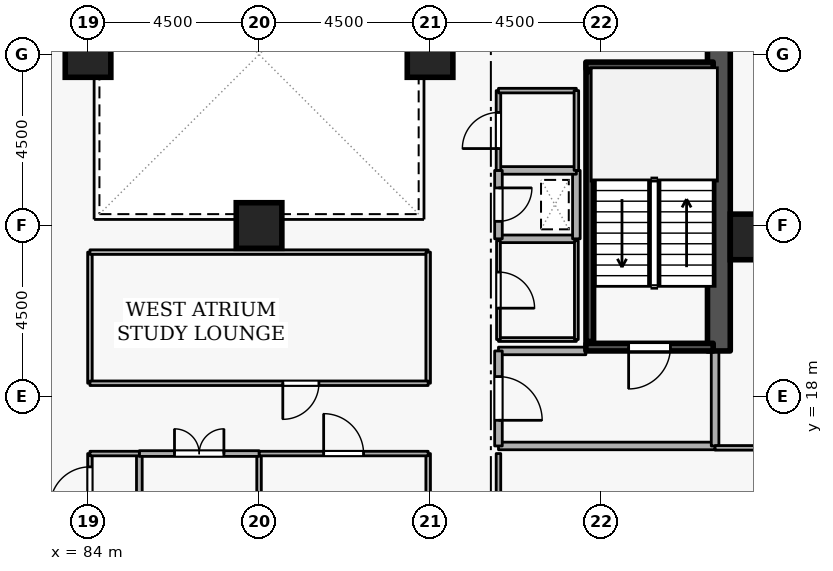
"""IFC4 building model, lengths in metres.
Left out: names, types, materials, properties, quantities, classifications, styles, units other than length and angle.
Written with IfcOpenShell. Run it as: python <this file> out.ifc"""

import sys

from ifc_helpers import new_model, si_unit, direction, frame, frame_2d, origin, origin_2d, place, context, subcontext, project, spatial, rectangle, extrude, element, fill, save


model = new_model("IFC4")
c1 = context("Model", 3, precision=1e-05, world=origin(), true_north=direction((0.0, 1.0)))
c2 = subcontext(c1, "Body", "Model", "MODEL_VIEW")
j1 = project(units=[si_unit("LENGTHUNIT", "METRE"), si_unit("PLANEANGLEUNIT", "RADIAN")], contexts=[c1])
p1 = place(None, origin())
s1 = spatial("IfcSite", under=j1, at=p1, CompositionType="ELEMENT")
p2 = place(p1, origin())
s2 = spatial("IfcBuilding", under=s1, at=p2, CompositionType="ELEMENT")
p3 = place(p2, frame((0.0, 0.0, 116.1)))
s3 = spatial("IfcBuildingStorey", under=s2, at=p3, CompositionType="ELEMENT", Elevation=116.1)
p4 = place(p3, frame((100.6, 19.2, 0.0), z_axis=(0.0, 0.0, 1.0), x_axis=(0.0, 1.0, 0.0)))
e1 = element("IfcWall", 1, at=p4, inside=s3, PredefinedType="SHEAR", context=c2, shape_type="SweptSolid", body=[
    extrude(rectangle(XDim=15.6, YDim=0.6, at=frame_2d((7.8, 0.0))), origin(), (0.0, 0.0, 1.0), 3.6),
])
for number, where, z_axis, x_axis in (
    (2, (101.5, 22.2, 0.0), (0.0, 0.0, 1.0), (1.0, 0.0, 0.0)),
    (3, (93.0, 27.0, 0.0), (0.0, 0.0, 1.0), (1.0, 0.0, 0.0)),
    (4, (84.0, 27.0, 0.0), (0.0, 0.0, 1.0), (1.0, 0.0, 0.0)),
    (5, (88.5, 22.5, 0.0), (0.0, 0.0, 1.0), (1.0, 0.0, 0.0)),
):
    element("IfcColumn", number, at=place(p3, frame(where, z_axis=z_axis, x_axis=x_axis)), inside=s3, PredefinedType="COLUMN", context=c2, shape_type="SweptSolid", body=[
        extrude(rectangle(XDim=1.2, YDim=1.2, at=origin_2d()), origin(), (0.0, 0.0, 1.0), 3.6),
    ])
p5 = place(p3, frame((100.45, 19.3, 0.0), z_axis=(0.0, 0.0, 1.0), x_axis=(-1.0, 0.0, 0.0)))
e6 = element("IfcWall", 6, at=p5, inside=s3, PredefinedType="SHEAR", context=c2, shape_type="SweptSolid", body=[
    extrude(rectangle(XDim=3.35, YDim=0.2, at=frame_2d((1.675, 0.0))), origin(), (0.0, 0.0, 1.0), 3.6),
])
p6 = place(p5, frame((1.125, 0.0, 0.0)))
e7 = element("IfcOpeningElement", 7, at=p6, cuts=e6, PredefinedType="OPENING", context=c2, shape_type="SweptSolid", body=[
    extrude(rectangle(XDim=1.1, YDim=2.1, at=frame_2d((0.55, 1.05))), frame((0.0, 0.11, 0.0), z_axis=(0.0, -1.0, 0.0), x_axis=(1.0, 0.0, 0.0)), (0.0, 0.0, 1.0), 0.22),
])
p7 = place(p3, frame((97.1, 26.7, 0.0), z_axis=(0.0, 0.0, 1.0), x_axis=(1.0, 0.0, 0.0)))
e8 = element("IfcWall", 8, at=p7, inside=s3, PredefinedType="SHEAR", context=c2, shape_type="SweptSolid", body=[
    extrude(rectangle(XDim=3.35, YDim=0.2, at=frame_2d((1.675, 0.0))), origin(), (0.0, 0.0, 1.0), 3.6),
])
p8 = place(p3, frame((97.203, 26.55, 0.0), z_axis=(0.0, 0.0, 1.0), x_axis=(0.0, -1.0, 0.0)))
e9 = element("IfcWall", 9, at=p8, inside=s3, PredefinedType="SHEAR", context=c2, shape_type="SweptSolid", body=[
    extrude(rectangle(XDim=7.1, YDim=0.2, at=frame_2d((3.55, 0.0))), origin(), (0.0, 0.0, 1.0), 3.6),
])
p9 = place(p3, frame((94.8, 16.7, 0.0), z_axis=(0.0, 0.0, 1.0), x_axis=(1.0, 0.0, 0.0)))
e10 = element("IfcWall", 10, at=p9, inside=s3, PredefinedType="STANDARD", context=c2, shape_type="SweptSolid", body=[
    extrude(rectangle(XDim=5.7, YDim=0.2, at=frame_2d((2.85, 0.0))), origin(), (0.0, 0.0, 1.0), 3.32),
])
p10 = place(p3, frame((100.5, 16.7, 0.0), z_axis=(0.0, 0.0, 1.0), x_axis=(0.0, 1.0, 0.0)))
e11 = element("IfcWall", 11, at=p10, inside=s3, PredefinedType="STANDARD", context=c2, shape_type="SweptSolid", body=[
    extrude(rectangle(XDim=2.5, YDim=0.2, at=frame_2d((1.25, 0.0))), origin(), (0.0, 0.0, 1.0), 3.32),
])
p11 = place(p3, frame((97.1, 19.2, 0.0), z_axis=(0.0, 0.0, 1.0), x_axis=(-1.0, 0.0, 0.0)))
e12 = element("IfcWall", 12, at=p11, inside=s3, PredefinedType="STANDARD", context=c2, shape_type="SweptSolid", body=[
    extrude(rectangle(XDim=2.3, YDim=0.2, at=frame_2d((1.15, 0.0))), origin(), (0.0, 0.0, 1.0), 2.525),
])
p12 = place(p3, frame((94.8, 19.2, 0.0), z_axis=(0.0, 0.0, 1.0), x_axis=(0.0, -1.0, 0.0)))
e13 = element("IfcWall", 13, at=p12, inside=s3, PredefinedType="STANDARD", context=c2, shape_type="SweptSolid", body=[
    extrude(rectangle(XDim=2.5, YDim=0.2, at=frame_2d((1.25, 0.0))), origin(), (0.0, 0.0, 1.0), 3.32),
])
p13 = place(p12, frame((0.675, 0.0, 0.0)))
e14 = element("IfcOpeningElement", 14, at=p13, cuts=e13, PredefinedType="OPENING", context=c2, shape_type="SweptSolid", body=[
    extrude(rectangle(XDim=1.15, YDim=2.1, at=frame_2d((0.575, 1.05))), frame((0.0, 0.11, 0.0), z_axis=(0.0, -1.0, 0.0), x_axis=(1.0, 0.0, 0.0)), (0.0, 0.0, 1.0), 0.22),
])
p14 = place(p3, frame((94.8, 22.15, 0.0), z_axis=(0.0, 0.0, 1.0), x_axis=(1.0, 0.0, 0.0)))
e15 = element("IfcWall", 15, at=p14, inside=s3, PredefinedType="STANDARD", context=c2, shape_type="SweptSolid", body=[
    extrude(rectangle(XDim=2.05, YDim=0.2, at=frame_2d((1.025, 0.0))), origin(), (0.0, 0.0, 1.0), 3.32),
])
p15 = place(p3, frame((96.85, 22.15, 0.0), z_axis=(0.0, 0.0, 1.0), x_axis=(0.0, 1.0, 0.0)))
e16 = element("IfcWall", 16, at=p15, inside=s3, PredefinedType="STANDARD", context=c2, shape_type="SweptSolid", body=[
    extrude(rectangle(XDim=1.8, YDim=0.2, at=frame_2d((0.9, 0.0))), origin(), (0.0, 0.0, 1.0), 3.32),
])
p16 = place(p3, frame((96.85, 23.95, 0.0), z_axis=(0.0, 0.0, 1.0), x_axis=(-1.0, 0.0, 0.0)))
e17 = element("IfcWall", 17, at=p16, inside=s3, PredefinedType="STANDARD", context=c2, shape_type="SweptSolid", body=[
    extrude(rectangle(XDim=2.05, YDim=0.2, at=frame_2d((1.025, 0.0))), origin(), (0.0, 0.0, 1.0), 3.32),
])
p17 = place(p3, frame((94.8, 23.95, 0.0), z_axis=(0.0, 0.0, 1.0), x_axis=(0.0, -1.0, 0.0)))
e18 = element("IfcWall", 18, at=p17, inside=s3, PredefinedType="STANDARD", context=c2, shape_type="SweptSolid", body=[
    extrude(rectangle(XDim=1.8, YDim=0.2, at=frame_2d((0.9, 0.0))), origin(), (0.0, 0.0, 1.0), 3.32),
])
p18 = place(p17, frame((0.46, 0.0, 0.0)))
e19 = element("IfcOpeningElement", 19, at=p18, cuts=e18, PredefinedType="OPENING", context=c2, shape_type="SweptSolid", body=[
    extrude(rectangle(XDim=0.88, YDim=2.04, at=frame_2d((0.44, 1.02))), frame((0.0, 0.11, 0.0), z_axis=(0.0, -1.0, 0.0), x_axis=(1.0, 0.0, 0.0)), (0.0, 0.0, 1.0), 0.22),
])
p19 = place(p3, frame((94.8, 19.5, 0.0), z_axis=(0.0, 0.0, 1.0), x_axis=(1.0, 0.0, 0.0)))
e20 = element("IfcWall", 20, at=p19, inside=s3, PredefinedType="PARTITIONING", context=c2, shape_type="SweptSolid", body=[
    extrude(rectangle(XDim=2.05, YDim=0.1, at=frame_2d((1.025, 0.0))), origin(), (0.0, 0.0, 1.0), 2.525),
])
p20 = place(p3, frame((96.85, 19.5, 0.0), z_axis=(0.0, 0.0, 1.0), x_axis=(0.0, 1.0, 0.0)))
e21 = element("IfcWall", 21, at=p20, inside=s3, PredefinedType="PARTITIONING", context=c2, shape_type="SweptSolid", body=[
    extrude(rectangle(XDim=2.6, YDim=0.1, at=frame_2d((1.3, 0.0))), origin(), (0.0, 0.0, 1.0), 3.32),
])
p21 = place(p3, frame((94.8, 22.1, 0.0), z_axis=(0.0, 0.0, 1.0), x_axis=(0.0, -1.0, 0.0)))
e22 = element("IfcWall", 22, at=p21, inside=s3, PredefinedType="PARTITIONING", context=c2, shape_type="SweptSolid", body=[
    extrude(rectangle(XDim=2.6, YDim=0.1, at=frame_2d((1.3, 0.0))), origin(), (0.0, 0.0, 1.0), 3.32),
])
p22 = place(p21, frame((0.825, 0.0, 0.0)))
e23 = element("IfcOpeningElement", 23, at=p22, cuts=e22, PredefinedType="OPENING", context=c2, shape_type="SweptSolid", body=[
    extrude(rectangle(XDim=0.95, YDim=2.1, at=frame_2d((0.475, 1.05))), frame((0.0, 0.06, 0.0), z_axis=(0.0, -1.0, 0.0), x_axis=(1.0, 0.0, 0.0)), (0.0, 0.0, 1.0), 0.12),
])
p23 = place(p3, frame((94.8, 23.95, 0.0), z_axis=(0.0, 0.0, 1.0), x_axis=(0.0, 1.0, 0.0)))
e24 = element("IfcWall", 24, at=p23, inside=s3, PredefinedType="PARTITIONING", context=c2, shape_type="SweptSolid", body=[
    extrude(rectangle(XDim=2.1, YDim=0.12, at=frame_2d((1.05, 0.0))), origin(), (0.0, 0.0, 1.0), 3.32),
])
p24 = place(p23, frame((0.575, 0.0, 0.0)))
e25 = element("IfcOpeningElement", 25, at=p24, cuts=e24, PredefinedType="OPENING", context=c2, shape_type="SweptSolid", body=[
    extrude(rectangle(XDim=0.95, YDim=2.1, at=frame_2d((0.475, 1.05))), frame((0.0, 0.07, 0.0), z_axis=(0.0, -1.0, 0.0), x_axis=(1.0, 0.0, 0.0)), (0.0, 0.0, 1.0), 0.14),
])
p25 = place(p3, frame((94.8, 26.05, 0.0), z_axis=(0.0, 0.0, 1.0), x_axis=(1.0, 0.0, 0.0)))
e26 = element("IfcWall", 26, at=p25, inside=s3, PredefinedType="PARTITIONING", context=c2, shape_type="SweptSolid", body=[
    extrude(rectangle(XDim=2.05, YDim=0.12, at=frame_2d((1.025, 0.0))), origin(), (0.0, 0.0, 1.0), 3.32),
])
p26 = place(p3, frame((96.85, 26.05, 0.0), z_axis=(0.0, 0.0, 1.0), x_axis=(0.0, -1.0, 0.0)))
e27 = element("IfcWall", 27, at=p26, inside=s3, PredefinedType="PARTITIONING", context=c2, shape_type="SweptSolid", body=[
    extrude(rectangle(XDim=2.1, YDim=0.12, at=frame_2d((1.05, 0.0))), origin(), (0.0, 0.0, 1.0), 3.32),
])
for number, where, z_axis, x_axis in (
    (28, (92.95, 16.5, 0.0), (0.0, 0.0, 1.0), (0.0, -1.0, 0.0)),
    (29, (94.8, 14.75, 0.0), (0.0, 0.0, 1.0), (0.0, 1.0, 0.0)),
):
    element("IfcWall", number, at=place(p3, frame(where, z_axis=z_axis, x_axis=x_axis)), inside=s3, PredefinedType="PARTITIONING", context=c2, shape_type="SweptSolid", body=[
        extrude(rectangle(XDim=1.75, YDim=0.12, at=frame_2d((0.875, 0.0))), origin(), (0.0, 0.0, 1.0), 3.32),
    ])
p27 = place(p3, frame((100.5, 16.65, 0.0), z_axis=(0.0, 0.0, 1.0), x_axis=(1.0, 0.0, 0.0)))
e30 = element("IfcWall", 30, at=p27, inside=s3, PredefinedType="PARTITIONING", context=c2, shape_type="SweptSolid", body=[
    extrude(rectangle(XDim=5.92, YDim=0.12, at=frame_2d((2.96, 0.0))), origin(), (0.0, 0.0, 1.0), 3.32),
])
p28 = place(p3, frame((88.5, 7.414, 0.0), z_axis=(0.0, 0.0, 1.0), x_axis=(0.0, 1.0, 0.0)))
e31 = element("IfcWall", 31, at=p28, inside=s3, PredefinedType="PARTITIONING", context=c2, shape_type="SweptSolid", body=[
    extrude(rectangle(XDim=9.086, YDim=0.12, at=frame_2d((4.543, 0.0))), origin(), (0.0, 0.0, 1.0), 1.685),
])
p29 = place(p3, frame((88.5, 16.5, 0.0), z_axis=(0.0, 0.0, 1.0), x_axis=(1.0, 0.0, 0.0)))
e32 = element("IfcWall", 32, at=p29, inside=s3, PredefinedType="PARTITIONING", context=c2, shape_type="SweptSolid", body=[
    extrude(rectangle(XDim=4.45, YDim=0.12, at=frame_2d((2.225, 0.0))), origin(), (0.0, 0.0, 1.0), 3.32),
])
p30 = place(p29, frame((1.7, 0.0, 0.0)))
e33 = element("IfcOpeningElement", 33, at=p30, cuts=e32, PredefinedType="OPENING", context=c2, shape_type="SweptSolid", body=[
    extrude(rectangle(XDim=1.05, YDim=2.1, at=frame_2d((0.525, 1.05))), frame((0.0, 0.07, 0.0), z_axis=(0.0, -1.0, 0.0), x_axis=(1.0, 0.0, 0.0)), (0.0, 0.0, 1.0), 0.14),
])
p31 = place(p3, frame((85.35, 3.08, 0.0), z_axis=(0.0, 0.0, 1.0), x_axis=(0.0, 1.0, 0.0)))
e34 = element("IfcWall", 34, at=p31, inside=s3, PredefinedType="PARTITIONING", context=c2, shape_type="SweptSolid", body=[
    extrude(rectangle(XDim=13.42, YDim=0.15, at=frame_2d((6.71, 0.0))), origin(), (0.0, 0.0, 1.0), 3.32),
])
p32 = place(p3, frame((85.35, 16.5, 0.0), z_axis=(0.0, 0.0, 1.0), x_axis=(1.0, 0.0, 0.0)))
e35 = element("IfcWall", 35, at=p32, inside=s3, PredefinedType="PARTITIONING", context=c2, shape_type="SweptSolid", body=[
    extrude(rectangle(XDim=3.15, YDim=0.15, at=frame_2d((1.575, 0.0))), origin(), (0.0, 0.0, 1.0), 3.32),
])
p33 = place(p32, frame((0.925, 0.0, 0.0)))
e36 = element("IfcOpeningElement", 36, at=p33, cuts=e35, PredefinedType="OPENING", context=c2, shape_type="SweptSolid", body=[
    extrude(rectangle(XDim=1.3, YDim=2.12, at=frame_2d((0.65, 1.06))), frame((0.0, 0.085, 0.0), z_axis=(0.0, -1.0, 0.0), x_axis=(1.0, 0.0, 0.0)), (0.0, 0.0, 1.0), 0.17),
])
p34 = place(p3, frame((84.05, 14.75, 0.0), z_axis=(0.0, 0.0, 1.0), x_axis=(0.0, 1.0, 0.0)))
e37 = element("IfcWall", 37, at=p34, inside=s3, PredefinedType="PARTITIONING", context=c2, shape_type="SweptSolid", body=[
    extrude(rectangle(XDim=1.75, YDim=0.12, at=frame_2d((0.875, 0.0))), origin(), (0.0, 0.0, 1.0), 3.32),
])
p35 = place(p34, frame((0.35, 0.0, 0.0)))
e38 = element("IfcOpeningElement", 38, at=p35, cuts=e37, PredefinedType="OPENING", context=c2, shape_type="SweptSolid", body=[
    extrude(rectangle(XDim=1.05, YDim=2.1, at=frame_2d((0.525, 1.05))), frame((0.0, 0.07, 0.0), z_axis=(0.0, -1.0, 0.0), x_axis=(1.0, 0.0, 0.0)), (0.0, 0.0, 1.0), 0.14),
])
p36 = place(p3, frame((84.05, 16.5, 0.0), z_axis=(0.0, 0.0, 1.0), x_axis=(1.0, 0.0, 0.0)))
e39 = element("IfcWall", 39, at=p36, inside=s3, PredefinedType="PARTITIONING", context=c2, shape_type="SweptSolid", body=[
    extrude(rectangle(XDim=1.3, YDim=0.12, at=frame_2d((0.65, 0.0))), origin(), (0.0, 0.0, 1.0), 3.32),
])
p37 = place(p3, frame((84.05, 18.35, 0.0), z_axis=(0.0, 0.0, 1.0), x_axis=(0.0, 1.0, 0.0)))
e40 = element("IfcWall", 40, at=p37, inside=s3, PredefinedType="PARTITIONING", context=c2, shape_type="SweptSolid", body=[
    extrude(rectangle(XDim=3.45, YDim=0.12, at=frame_2d((1.725, 0.0))), origin(), (0.0, 0.0, 1.0), 3.32),
])
p38 = place(p3, frame((84.05, 21.8, 0.0), z_axis=(0.0, 0.0, 1.0), x_axis=(1.0, 0.0, 0.0)))
e41 = element("IfcWall", 41, at=p38, inside=s3, PredefinedType="PARTITIONING", context=c2, shape_type="SweptSolid", body=[
    extrude(rectangle(XDim=8.9, YDim=0.12, at=frame_2d((4.45, 0.0))), origin(), (0.0, 0.0, 1.0), 3.32),
])
p39 = place(p3, frame((92.95, 21.8, 0.0), z_axis=(0.0, 0.0, 1.0), x_axis=(0.0, -1.0, 0.0)))
e42 = element("IfcWall", 42, at=p39, inside=s3, PredefinedType="PARTITIONING", context=c2, shape_type="SweptSolid", body=[
    extrude(rectangle(XDim=3.45, YDim=0.12, at=frame_2d((1.725, 0.0))), origin(), (0.0, 0.0, 1.0), 3.32),
])
p40 = place(p3, frame((92.95, 18.35, 0.0), z_axis=(0.0, 0.0, 1.0), x_axis=(-1.0, 0.0, 0.0)))
e43 = element("IfcWall", 43, at=p40, inside=s3, PredefinedType="PARTITIONING", context=c2, shape_type="SweptSolid", body=[
    extrude(rectangle(XDim=8.9, YDim=0.12, at=frame_2d((4.45, 0.0))), origin(), (0.0, 0.0, 1.0), 3.32),
])
p41 = place(p40, frame((2.875, 0.0, 0.0)))
e44 = element("IfcOpeningElement", 44, at=p41, cuts=e43, PredefinedType="OPENING", context=c2, shape_type="SweptSolid", body=[
    extrude(rectangle(XDim=0.95, YDim=2.1, at=frame_2d((0.475, 1.05))), frame((0.0, 0.07, 0.0), z_axis=(0.0, -1.0, 0.0), x_axis=(1.0, 0.0, 0.0)), (0.0, 0.0, 1.0), 0.14),
])
p42 = place(p6, origin())
e45 = element("IfcDoor", 45, at=p42, inside=s3, OperationType="SINGLE_SWING_RIGHT", PredefinedType="DOOR", context=c2, shape_type="SweptSolid", body=[
    extrude(rectangle(XDim=1.1, YDim=2.1, at=frame_2d((0.55, 1.05))), frame((0.0, 0.025, 0.0), z_axis=(0.0, -1.0, 0.0), x_axis=(1.0, 0.0, 0.0)), (0.0, 0.0, 1.0), 0.05),
])
fill(e7, e45)
p43 = place(p13, origin())
e46 = element("IfcDoor", 46, at=p43, inside=s3, OperationType="SINGLE_SWING_RIGHT", PredefinedType="DOOR", context=c2, shape_type="SweptSolid", body=[
    extrude(rectangle(XDim=1.15, YDim=2.1, at=frame_2d((0.575, 1.05))), frame((0.0, 0.025, 0.0), z_axis=(0.0, -1.0, 0.0), x_axis=(1.0, 0.0, 0.0)), (0.0, 0.0, 1.0), 0.05),
])
fill(e14, e46)
p44 = place(p18, origin())
e47 = element("IfcDoor", 47, at=p44, inside=s3, OperationType="SINGLE_SWING_LEFT", PredefinedType="DOOR", context=c2, shape_type="SweptSolid", body=[
    extrude(rectangle(XDim=0.88, YDim=2.04, at=frame_2d((0.44, 1.02))), frame((0.0, 0.025, 0.0), z_axis=(0.0, -1.0, 0.0), x_axis=(1.0, 0.0, 0.0)), (0.0, 0.0, 1.0), 0.05),
])
fill(e19, e47)
p45 = place(p22, origin())
e48 = element("IfcDoor", 48, at=p45, inside=s3, OperationType="SINGLE_SWING_RIGHT", PredefinedType="DOOR", context=c2, shape_type="SweptSolid", body=[
    extrude(rectangle(XDim=0.95, YDim=2.1, at=frame_2d((0.475, 1.05))), frame((0.0, 0.025, 0.0), z_axis=(0.0, -1.0, 0.0), x_axis=(1.0, 0.0, 0.0)), (0.0, 0.0, 1.0), 0.05),
])
fill(e23, e48)
p46 = place(p24, origin())
e49 = element("IfcDoor", 49, at=p46, inside=s3, OperationType="SINGLE_SWING_LEFT", PredefinedType="DOOR", context=c2, shape_type="SweptSolid", body=[
    extrude(rectangle(XDim=0.95, YDim=2.1, at=frame_2d((0.475, 1.05))), frame((0.0, 0.025, 0.0), z_axis=(0.0, -1.0, 0.0), x_axis=(1.0, 0.0, 0.0)), (0.0, 0.0, 1.0), 0.05),
])
fill(e25, e49)
p47 = place(p30, origin())
e50 = element("IfcDoor", 50, at=p47, inside=s3, OperationType="SINGLE_SWING_LEFT", PredefinedType="DOOR", context=c2, shape_type="SweptSolid", body=[
    extrude(rectangle(XDim=1.05, YDim=2.1, at=frame_2d((0.525, 1.05))), frame((0.0, 0.025, 0.0), z_axis=(0.0, -1.0, 0.0), x_axis=(1.0, 0.0, 0.0)), (0.0, 0.0, 1.0), 0.05),
])
fill(e33, e50)
p48 = place(p33, origin())
e51 = element("IfcDoor", 51, at=p48, inside=s3, OperationType="DOUBLE_DOOR_SINGLE_SWING", PredefinedType="DOOR", context=c2, shape_type="SweptSolid", body=[
    extrude(rectangle(XDim=1.3, YDim=2.12, at=frame_2d((0.65, 1.06))), frame((0.0, 0.025, 0.0), z_axis=(0.0, -1.0, 0.0), x_axis=(1.0, 0.0, 0.0)), (0.0, 0.0, 1.0), 0.05),
])
fill(e36, e51)
p49 = place(p35, origin())
e52 = element("IfcDoor", 52, at=p49, inside=s3, OperationType="SINGLE_SWING_LEFT", PredefinedType="DOOR", context=c2, shape_type="SweptSolid", body=[
    extrude(rectangle(XDim=1.05, YDim=2.1, at=frame_2d((0.525, 1.05))), frame((0.0, 0.025, 0.0), z_axis=(0.0, -1.0, 0.0), x_axis=(1.0, 0.0, 0.0)), (0.0, 0.0, 1.0), 0.05),
])
fill(e38, e52)
p50 = place(p41, origin())
e53 = element("IfcDoor", 53, at=p50, inside=s3, OperationType="SINGLE_SWING_RIGHT", PredefinedType="DOOR", context=c2, shape_type="SweptSolid", body=[
    extrude(rectangle(XDim=0.95, YDim=2.1, at=frame_2d((0.475, 1.05))), frame((0.0, 0.025, 0.0), z_axis=(0.0, -1.0, 0.0), x_axis=(1.0, 0.0, 0.0)), (0.0, 0.0, 1.0), 0.05),
])
fill(e44, e53)
save(model, sys.argv[1])
